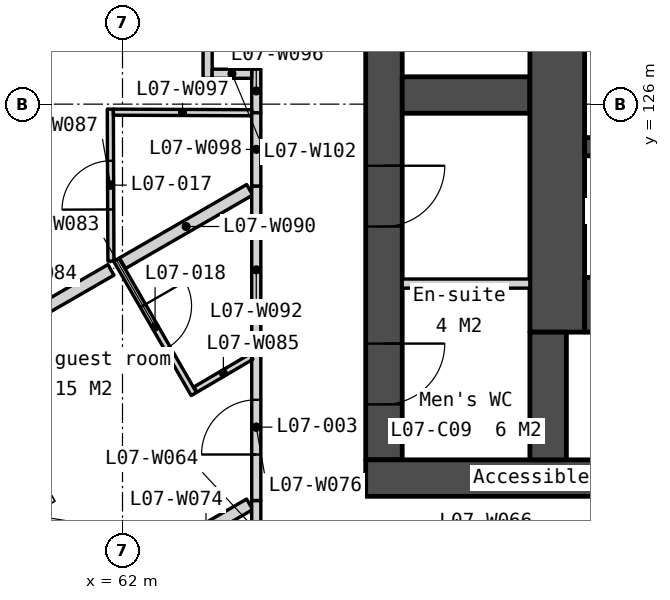
"""IFC4 building model, lengths in metres.
Left out: names, types, materials, properties, quantities, classifications, styles, units other than length and angle.
Written with IfcOpenShell. Run it as: python <this file> out.ifc"""

import sys

from ifc_helpers import new_model, si_unit, direction, frame, frame_2d, origin, place, context, subcontext, project, spatial, polyline, rectangle, outline, extrude, element, fill, save


model = new_model("IFC4")
c1 = context("Model", 3, precision=1e-05, world=origin(), true_north=direction((0.0, 1.0)))
c2 = subcontext(c1, "Body", "Model", "MODEL_VIEW")
j1 = project(units=[si_unit("LENGTHUNIT", "METRE"), si_unit("PLANEANGLEUNIT", "RADIAN")], contexts=[c1])
p1 = place(None, origin())
s1 = spatial("IfcSite", under=j1, at=p1, CompositionType="ELEMENT")
p2 = place(p1, origin())
s2 = spatial("IfcBuilding", under=s1, at=p2, CompositionType="ELEMENT")
p3 = place(p2, frame((0.0, 0.0, 38.5)))
s3 = spatial("IfcBuildingStorey", under=s2, at=p3, CompositionType="ELEMENT", Elevation=38.5)
p4 = place(p3, frame((66.3, 133.95, 0.0), z_axis=(0.0, 0.0, 1.0), x_axis=(0.0, -1.0, 0.0)))
e1 = element("IfcWall", 1, at=p4, inside=s3, PredefinedType="SOLIDWALL", context=c2, shape_type="SweptSolid", body=[
    extrude(rectangle(XDim=13.8, YDim=0.6, at=frame_2d((6.9, 0.0))), origin(), (0.0, 0.0, 1.0), 3.35),
])
p5 = place(p4, frame((0.6, 0.0, 0.0)))
e2 = element("IfcOpeningElement", 2, at=p5, cuts=e1, PredefinedType="OPENING", context=c2, shape_type="SweptSolid", body=[
    extrude(rectangle(XDim=1.1, YDim=2.1, at=frame_2d((0.55, 1.05))), frame((0.0, 0.31, 0.0), z_axis=(0.0, -1.0, 0.0), x_axis=(1.0, 0.0, 0.0)), (0.0, 0.0, 1.0), 0.62),
])
p6 = place(p4, frame((8.963, 0.0, 0.0)))
e3 = element("IfcOpeningElement", 3, at=p6, cuts=e1, PredefinedType="OPENING", context=c2, shape_type="SweptSolid", body=[
    extrude(rectangle(XDim=1.0, YDim=2.1, at=frame_2d((0.5, 1.05))), frame((0.0, 0.31, 0.0), z_axis=(0.0, -1.0, 0.0), x_axis=(1.0, 0.0, 0.0)), (0.0, 0.0, 1.0), 0.62),
])
p7 = place(p4, frame((11.888, 0.0, 0.0)))
e4 = element("IfcOpeningElement", 4, at=p7, cuts=e1, PredefinedType="OPENING", context=c2, shape_type="SweptSolid", body=[
    extrude(rectangle(XDim=1.0, YDim=2.1, at=frame_2d((0.5, 1.05))), frame((0.0, 0.31, 0.0), z_axis=(0.0, -1.0, 0.0), x_axis=(1.0, 0.0, 0.0)), (0.0, 0.0, 1.0), 0.62),
])
p8 = place(p3, frame((66.0, 119.85, 0.0), z_axis=(0.0, 0.0, 1.0), x_axis=(1.0, 0.0, 0.0)))
e5 = element("IfcWall", 5, at=p8, inside=s3, PredefinedType="SOLIDWALL", context=c2, shape_type="SweptSolid", body=[
    extrude(rectangle(XDim=28.0, YDim=0.6, at=frame_2d((14.0, 0.0))), origin(), (0.0, 0.0, 1.0), 3.35),
])
p9 = place(p8, frame((6.825, 0.0, 0.0)))
e6 = element("IfcOpeningElement", 6, at=p9, cuts=e5, PredefinedType="OPENING", context=c2, shape_type="SweptSolid", body=[
    extrude(rectangle(XDim=1.8, YDim=2.1, at=frame_2d((0.9, 1.05))), frame((0.0, 0.31, 0.0), z_axis=(0.0, -1.0, 0.0), x_axis=(1.0, 0.0, 0.0)), (0.0, 0.0, 1.0), 0.62),
])
p10 = place(p8, frame((15.85, 0.0, 0.0)))
e7 = element("IfcOpeningElement", 7, at=p10, cuts=e5, PredefinedType="OPENING", context=c2, shape_type="SweptSolid", body=[
    extrude(rectangle(XDim=1.5, YDim=2.1, at=frame_2d((0.75, 1.05))), frame((0.0, 0.31, 0.0), z_axis=(0.0, -1.0, 0.0), x_axis=(1.0, 0.0, 0.0)), (0.0, 0.0, 1.0), 0.62),
])
p11 = place(p8, frame((19.375, 0.0, 0.0)))
e8 = element("IfcOpeningElement", 8, at=p11, cuts=e5, PredefinedType="OPENING", context=c2, shape_type="SweptSolid", body=[
    extrude(rectangle(XDim=1.8, YDim=2.1, at=frame_2d((0.9, 1.05))), frame((0.0, 0.31, 0.0), z_axis=(0.0, -1.0, 0.0), x_axis=(1.0, 0.0, 0.0)), (0.0, 0.0, 1.0), 0.62),
])
p12 = place(p8, frame((4.425, 0.0, 0.0)))
e9 = element("IfcOpeningElement", 9, at=p12, cuts=e5, PredefinedType="OPENING", context=c2, shape_type="SweptSolid", body=[
    extrude(rectangle(XDim=1.0, YDim=2.1, at=frame_2d((0.5, 1.05))), frame((0.0, 0.31, 0.0), z_axis=(0.0, -1.0, 0.0), x_axis=(1.0, 0.0, 0.0)), (0.0, 0.0, 1.0), 0.62),
])
p13 = place(p8, frame((9.783, 0.0, 0.0)))
e10 = element("IfcOpeningElement", 10, at=p13, cuts=e5, PredefinedType="OPENING", context=c2, shape_type="SweptSolid", body=[
    extrude(rectangle(XDim=1.0, YDim=2.1, at=frame_2d((0.5, 1.05))), frame((0.0, 0.31, 0.0), z_axis=(0.0, -1.0, 0.0), x_axis=(1.0, 0.0, 0.0)), (0.0, 0.0, 1.0), 0.62),
])
p14 = place(p8, frame((11.525, 0.0, 0.0)))
e11 = element("IfcOpeningElement", 11, at=p14, cuts=e5, PredefinedType="OPENING", context=c2, shape_type="SweptSolid", body=[
    extrude(rectangle(XDim=1.0, YDim=2.1, at=frame_2d((0.5, 1.05))), frame((0.0, 0.31, 0.0), z_axis=(0.0, -1.0, 0.0), x_axis=(1.0, 0.0, 0.0)), (0.0, 0.0, 1.0), 0.62),
])
p15 = place(p8, frame((13.658, 0.0, 0.0)))
e12 = element("IfcOpeningElement", 12, at=p15, cuts=e5, PredefinedType="OPENING", context=c2, shape_type="SweptSolid", body=[
    extrude(rectangle(XDim=1.0, YDim=2.1, at=frame_2d((0.5, 1.05))), frame((0.0, 0.31, 0.0), z_axis=(0.0, -1.0, 0.0), x_axis=(1.0, 0.0, 0.0)), (0.0, 0.0, 1.0), 0.62),
])
p16 = place(p8, frame((22.575, 0.0, 0.0)))
e13 = element("IfcOpeningElement", 13, at=p16, cuts=e5, PredefinedType="OPENING", context=c2, shape_type="SweptSolid", body=[
    extrude(rectangle(XDim=1.0, YDim=2.1, at=frame_2d((0.5, 1.05))), frame((0.0, 0.31, 0.0), z_axis=(0.0, -1.0, 0.0), x_axis=(1.0, 0.0, 0.0)), (0.0, 0.0, 1.0), 0.62),
])
p17 = place(p3, frame((66.6, 126.15, 0.0), z_axis=(0.0, 0.0, 1.0), x_axis=(1.0, 0.0, 0.0)))
e14 = element("IfcWall", 14, at=p17, inside=s3, PredefinedType="SOLIDWALL", context=c2, shape_type="SweptSolid", body=[
    extrude(rectangle(XDim=2.1, YDim=0.6, at=frame_2d((1.05, 0.0))), origin(), (0.0, 0.0, 1.0), 3.35),
])
p18 = place(p3, frame((66.6, 123.049, 0.0), z_axis=(0.0, 0.0, 1.0), x_axis=(1.0, 0.0, 0.0)))
e15 = element("IfcWall", 15, at=p18, inside=s3, PredefinedType="PARTITIONING", context=c2, shape_type="SweptSolid", body=[
    extrude(rectangle(XDim=2.1, YDim=0.15, at=frame_2d((1.05, 0.0))), origin(), (0.0, 0.0, 1.0), 3.35),
])
p19 = place(p3, frame((69.15, 133.95, 0.0), z_axis=(0.0, 0.0, 1.0), x_axis=(0.0, -1.0, 0.0)))
e16 = element("IfcWall", 16, at=p19, inside=s3, PredefinedType="SOLIDWALL", context=c2, shape_type="SweptSolid", body=[
    extrude(rectangle(XDim=11.7, YDim=0.9, at=frame_2d((5.85, 0.0))), origin(), (0.0, 0.0, 1.0), 3.35),
])
p20 = place(p3, frame((69.0, 122.25, 0.0), z_axis=(0.0, 0.0, 1.0), x_axis=(0.0, -1.0, 0.0)))
e17 = element("IfcWall", 17, at=p20, inside=s3, PredefinedType="SOLIDWALL", context=c2, shape_type="SweptSolid", body=[
    extrude(rectangle(XDim=2.1, YDim=0.6, at=frame_2d((1.05, 0.0))), origin(), (0.0, 0.0, 1.0), 3.35),
])
p21 = place(p3, frame((69.6, 125.3, 0.0), z_axis=(0.0, 0.0, 1.0), x_axis=(1.0, 0.0, 0.0)))
e18 = element("IfcWall", 18, at=p21, inside=s3, PredefinedType="SOLIDWALL", context=c2, shape_type="SweptSolid", body=[
    extrude(rectangle(XDim=2.55, YDim=0.3, at=frame_2d((1.275, 0.0))), origin(), (0.0, 0.0, 1.0), 3.35),
])
p22 = place(p3, frame((69.6, 122.7, 0.0), z_axis=(0.0, 0.0, 1.0), x_axis=(1.0, 0.0, 0.0)))
e19 = element("IfcWall", 19, at=p22, inside=s3, PredefinedType="SOLIDWALL", context=c2, shape_type="SweptSolid", body=[
    extrude(rectangle(XDim=2.55, YDim=0.9, at=frame_2d((1.275, 0.0))), origin(), (0.0, 0.0, 1.0), 3.35),
])
p23 = place(p3, frame((54.495, 129.397, -0.15), z_axis=(0.0, 0.0, 1.0), x_axis=(0.499999201451, -0.866025864826, 0.0)))
e20 = element("IfcWall", 20, at=p23, inside=s3, PredefinedType="SOLIDWALL", context=c2, shape_type="SweptSolid", body=[
    extrude(outline(polyline([(44.8, 0.0), (44.8, 3.5), (0.0, 3.5), (0.0, 0.0), (44.8, 0.0)])), frame((0.0, 0.225, 0.0), z_axis=(0.0, -1.0, 0.0), x_axis=(1.0, 0.0, 0.0)), (0.0, 0.0, 1.0), 0.45),
])
p24 = place(p23, frame((0.722, 0.0, 1.05)))
e21 = element("IfcOpeningElement", 21, at=p24, cuts=e20, PredefinedType="OPENING", context=c2, shape_type="SweptSolid", body=[
    extrude(rectangle(XDim=1.2, YDim=1.5, at=frame_2d((0.6, 0.75))), frame((0.0, 0.235, 0.0), z_axis=(0.0, -1.0, 0.0), x_axis=(1.0, 0.0, 0.0)), (0.0, 0.0, 1.0), 0.47),
])
p25 = place(p23, frame((7.51, 0.0, 1.05)))
e22 = element("IfcOpeningElement", 22, at=p25, cuts=e20, PredefinedType="OPENING", context=c2, shape_type="SweptSolid", body=[
    extrude(rectangle(XDim=1.2, YDim=1.5, at=frame_2d((0.6, 0.75))), frame((0.0, 0.235, 0.0), z_axis=(0.0, -1.0, 0.0), x_axis=(1.0, 0.0, 0.0)), (0.0, 0.0, 1.0), 0.47),
])
p26 = place(p23, frame((9.21, 0.0, 1.05)))
e23 = element("IfcOpeningElement", 23, at=p26, cuts=e20, PredefinedType="OPENING", context=c2, shape_type="SweptSolid", body=[
    extrude(rectangle(XDim=1.2, YDim=1.5, at=frame_2d((0.6, 0.75))), frame((0.0, 0.235, 0.0), z_axis=(0.0, -1.0, 0.0), x_axis=(1.0, 0.0, 0.0)), (0.0, 0.0, 1.0), 0.47),
])
p27 = place(p23, frame((16.47, 0.0, 1.05)))
e24 = element("IfcOpeningElement", 24, at=p27, cuts=e20, PredefinedType="OPENING", context=c2, shape_type="SweptSolid", body=[
    extrude(rectangle(XDim=1.2, YDim=1.5, at=frame_2d((0.6, 0.75))), frame((0.0, 0.235, 0.0), z_axis=(0.0, -1.0, 0.0), x_axis=(1.0, 0.0, 0.0)), (0.0, 0.0, 1.0), 0.47),
])
p28 = place(p23, frame((18.17, 0.0, 1.05)))
e25 = element("IfcOpeningElement", 25, at=p28, cuts=e20, PredefinedType="OPENING", context=c2, shape_type="SweptSolid", body=[
    extrude(rectangle(XDim=1.2, YDim=1.5, at=frame_2d((0.6, 0.75))), frame((0.0, 0.235, 0.0), z_axis=(0.0, -1.0, 0.0), x_axis=(1.0, 0.0, 0.0)), (0.0, 0.0, 1.0), 0.47),
])
p29 = place(p23, frame((25.43, 0.0, 1.05)))
e26 = element("IfcOpeningElement", 26, at=p29, cuts=e20, PredefinedType="OPENING", context=c2, shape_type="SweptSolid", body=[
    extrude(rectangle(XDim=1.2, YDim=1.5, at=frame_2d((0.6, 0.75))), frame((0.0, 0.235, 0.0), z_axis=(0.0, -1.0, 0.0), x_axis=(1.0, 0.0, 0.0)), (0.0, 0.0, 1.0), 0.47),
])
p30 = place(p23, frame((27.13, 0.0, 1.05)))
e27 = element("IfcOpeningElement", 27, at=p30, cuts=e20, PredefinedType="OPENING", context=c2, shape_type="SweptSolid", body=[
    extrude(rectangle(XDim=1.2, YDim=1.5, at=frame_2d((0.6, 0.75))), frame((0.0, 0.235, 0.0), z_axis=(0.0, -1.0, 0.0), x_axis=(1.0, 0.0, 0.0)), (0.0, 0.0, 1.0), 0.47),
])
p31 = place(p23, frame((34.39, 0.0, 1.05)))
e28 = element("IfcOpeningElement", 28, at=p31, cuts=e20, PredefinedType="OPENING", context=c2, shape_type="SweptSolid", body=[
    extrude(rectangle(XDim=1.2, YDim=1.5, at=frame_2d((0.6, 0.75))), frame((0.0, 0.235, 0.0), z_axis=(0.0, -1.0, 0.0), x_axis=(1.0, 0.0, 0.0)), (0.0, 0.0, 1.0), 0.47),
])
p32 = place(p23, frame((36.09, 0.0, 1.05)))
e29 = element("IfcOpeningElement", 29, at=p32, cuts=e20, PredefinedType="OPENING", context=c2, shape_type="SweptSolid", body=[
    extrude(rectangle(XDim=1.2, YDim=1.5, at=frame_2d((0.6, 0.75))), frame((0.0, 0.235, 0.0), z_axis=(0.0, -1.0, 0.0), x_axis=(1.0, 0.0, 0.0)), (0.0, 0.0, 1.0), 0.47),
])
p33 = place(p23, frame((42.878, 0.0, 1.05)))
e30 = element("IfcOpeningElement", 30, at=p33, cuts=e20, PredefinedType="OPENING", context=c2, shape_type="SweptSolid", body=[
    extrude(rectangle(XDim=1.2, YDim=1.5, at=frame_2d((0.6, 0.75))), frame((0.0, 0.235, 0.0), z_axis=(0.0, -1.0, 0.0), x_axis=(1.0, 0.0, 0.0)), (0.0, 0.0, 1.0), 0.47),
])
p34 = place(p3, frame((62.654, 118.588, 0.0), z_axis=(0.0, 0.0, 1.0), x_axis=(0.866090081402, 0.499887958344, 0.0)))
e31 = element("IfcWall", 31, at=p34, inside=s3, PredefinedType="PARTITIONING", context=c2, shape_type="SweptSolid", body=[
    extrude(rectangle(XDim=1.66, YDim=0.2, at=frame_2d((0.83, 0.0))), origin(), (0.0, 0.0, 1.0), 3.35),
])
p35 = place(p3, frame((64.2, 117.825, 0.0), z_axis=(0.0, 0.0, 1.0), x_axis=(0.0, 1.0, 0.0)))
e32 = element("IfcWall", 32, at=p35, inside=s3, PredefinedType="PARTITIONING", context=c2, shape_type="SweptSolid", body=[
    extrude(rectangle(XDim=1.656, YDim=0.15, at=frame_2d((0.828, 0.0))), origin(), (0.0, 0.0, 1.0), 3.35),
])
p36 = place(p3, frame((64.2, 119.481, 0.0), z_axis=(0.0, 0.0, 1.0), x_axis=(0.0, 1.0, 0.0)))
e33 = element("IfcWall", 33, at=p36, inside=s3, PredefinedType="PARTITIONING", context=c2, shape_type="SweptSolid", body=[
    extrude(rectangle(XDim=2.413, YDim=0.15, at=frame_2d((1.207, 0.0))), origin(), (0.0, 0.0, 1.0), 3.35),
])
p37 = place(p36, frame((0.757, 0.0, 0.0)))
e34 = element("IfcOpeningElement", 34, at=p37, cuts=e33, PredefinedType="OPENING", context=c2, shape_type="SweptSolid", body=[
    extrude(rectangle(XDim=0.9, YDim=2.1, at=frame_2d((0.45, 1.05))), frame((0.0, 0.085, 0.0), z_axis=(0.0, -1.0, 0.0), x_axis=(1.0, 0.0, 0.0)), (0.0, 0.0, 1.0), 0.17),
])
p38 = place(p3, frame((61.898, 123.44, 0.0), z_axis=(0.0, 0.0, 1.0), x_axis=(0.499990435942, -0.866030925526, 0.0)))
e35 = element("IfcWall", 35, at=p38, inside=s3, PredefinedType="PARTITIONING", context=c2, shape_type="SweptSolid", body=[
    extrude(rectangle(XDim=2.55, YDim=0.1, at=frame_2d((1.275, 0.0))), origin(), (0.0, 0.0, 1.0), 3.35),
])
p39 = place(p38, frame((0.875, 0.0, 0.0)))
e36 = element("IfcOpeningElement", 36, at=p39, cuts=e35, PredefinedType="OPENING", context=c2, shape_type="SweptSolid", body=[
    extrude(rectangle(XDim=0.8, YDim=2.1, at=frame_2d((0.4, 1.05))), frame((0.0, 0.06, 0.0), z_axis=(0.0, -1.0, 0.0), x_axis=(1.0, 0.0, 0.0)), (0.0, 0.0, 1.0), 0.12),
])
p40 = place(p3, frame((59.17, 121.75, 0.0), z_axis=(0.0, 0.0, 1.0), x_axis=(0.86606157367, 0.499937346687, 0.0)))
e37 = element("IfcWall", 37, at=p40, inside=s3, PredefinedType="PARTITIONING", context=c2, shape_type="SweptSolid", body=[
    extrude(rectangle(XDim=3.049, YDim=0.2, at=frame_2d((1.524, 0.0))), origin(), (0.0, 0.0, 1.0), 3.35),
])
p41 = place(p3, frame((63.2, 121.306, 0.0), z_axis=(0.0, 0.0, 1.0), x_axis=(0.86196956313, 0.506960030216, 0.0)))
e38 = element("IfcWall", 38, at=p41, inside=s3, PredefinedType="PARTITIONING", context=c2, shape_type="SweptSolid", body=[
    extrude(rectangle(XDim=1.065, YDim=0.1, at=frame_2d((0.533, 0.0))), origin(), (0.0, 0.0, 1.0), 3.35),
])
p42 = place(p3, frame((61.809, 123.418, 0.0), z_axis=(0.0, 0.0, 1.0), x_axis=(-0.003807822423, 0.999992750218, 0.0)))
e39 = element("IfcWall", 39, at=p42, inside=s3, PredefinedType="PARTITIONING", context=c2, shape_type="SweptSolid", body=[
    extrude(rectangle(XDim=2.5, YDim=0.1, at=frame_2d((1.25, 0.0))), origin(), (0.0, 0.0, 1.0), 3.35),
])
p43 = place(p42, frame((0.85, 0.0, 0.0)))
e40 = element("IfcOpeningElement", 40, at=p43, cuts=e39, PredefinedType="OPENING", context=c2, shape_type="SweptSolid", body=[
    extrude(rectangle(XDim=0.8, YDim=2.1, at=frame_2d((0.4, 1.05))), frame((0.0, 0.06, 0.0), z_axis=(0.0, -1.0, 0.0), x_axis=(1.0, 0.0, 0.0)), (0.0, 0.0, 1.0), 0.12),
])
p44 = place(p3, frame((62.0, 123.384, 0.0), z_axis=(0.0, 0.0, 1.0), x_axis=(0.866032396701, 0.499987887718, 0.0)))
e41 = element("IfcWall", 41, at=p44, inside=s3, PredefinedType="PARTITIONING", context=c2, shape_type="SweptSolid", body=[
    extrude(rectangle(XDim=2.415, YDim=0.2, at=frame_2d((1.208, 0.0))), origin(), (0.0, 0.0, 1.0), 3.35),
])
p45 = place(p3, frame((64.2, 121.894, 0.0), z_axis=(0.0, 0.0, 1.0), x_axis=(0.0, 1.0, 0.0)))
e42 = element("IfcWall", 42, at=p45, inside=s3, PredefinedType="PARTITIONING", context=c2, shape_type="SweptSolid", body=[
    extrude(rectangle(XDim=2.76, YDim=0.15, at=frame_2d((1.38, 0.0))), origin(), (0.0, 0.0, 1.0), 3.35),
])
p46 = place(p3, frame((64.2, 125.858, 0.0), z_axis=(0.0, 0.0, 1.0), x_axis=(0.0, 1.0, 0.0)))
e43 = element("IfcWall", 43, at=p46, inside=s3, PredefinedType="PARTITIONING", context=c2, shape_type="SweptSolid", body=[
    extrude(rectangle(XDim=0.717, YDim=0.15, at=frame_2d((0.358, 0.0))), origin(), (0.0, 0.0, 1.0), 3.35),
])
p47 = place(p3, frame((61.85, 125.868, 0.0), z_axis=(0.0, 0.0, 1.0), x_axis=(0.999991684538, -0.004078094442, 0.0)))
e44 = element("IfcWall", 44, at=p47, inside=s3, PredefinedType="PARTITIONING", context=c2, shape_type="SweptSolid", body=[
    extrude(rectangle(XDim=2.275, YDim=0.1, at=frame_2d((1.137, 0.0))), origin(), (0.0, 0.0, 1.0), 3.35),
])
p48 = place(p3, frame((64.2, 124.654, 0.0), z_axis=(0.0, 0.0, 1.0), x_axis=(0.0, 1.0, 0.0)))
e45 = element("IfcWall", 45, at=p48, inside=s3, PredefinedType="PARTITIONING", context=c2, shape_type="SweptSolid", body=[
    extrude(rectangle(XDim=1.204, YDim=0.15, at=frame_2d((0.602, 0.0))), origin(), (0.0, 0.0, 1.0), 3.35),
])
p49 = place(p3, frame((63.4, 126.425, 0.0), z_axis=(0.0, 0.0, 1.0), x_axis=(0.0, 1.0, 0.0)))
e46 = element("IfcWall", 46, at=p49, inside=s3, PredefinedType="PARTITIONING", context=c2, shape_type="SweptSolid", body=[
    extrude(rectangle(XDim=7.649, YDim=0.15, at=frame_2d((3.825, 0.0))), origin(), (0.0, 0.0, 1.0), 3.35),
])
p50 = place(p49, frame((3.375, 0.0, 0.0)))
e47 = element("IfcOpeningElement", 47, at=p50, cuts=e46, PredefinedType="OPENING", context=c2, shape_type="SweptSolid", body=[
    extrude(rectangle(XDim=0.9, YDim=2.1, at=frame_2d((0.45, 1.05))), frame((0.0, 0.085, 0.0), z_axis=(0.0, -1.0, 0.0), x_axis=(1.0, 0.0, 0.0)), (0.0, 0.0, 1.0), 0.17),
])
p51 = place(p3, frame((63.475, 126.5, 0.0), z_axis=(0.0, 0.0, 1.0), x_axis=(1.0, 0.0, 0.0)))
e48 = element("IfcWall", 48, at=p51, inside=s3, PredefinedType="PARTITIONING", context=c2, shape_type="SweptSolid", body=[
    extrude(rectangle(XDim=0.65, YDim=0.15, at=frame_2d((0.325, 0.0))), origin(), (0.0, 0.0, 1.0), 3.35),
])
p52 = place(p6, origin())
e49 = element("IfcDoor", 49, at=p52, inside=s3, OperationType="SINGLE_SWING_LEFT", PredefinedType="DOOR", context=c2, shape_type="SweptSolid", body=[
    extrude(rectangle(XDim=1.0, YDim=2.1, at=frame_2d((0.5, 1.05))), frame((0.0, 0.025, 0.0), z_axis=(0.0, -1.0, 0.0), x_axis=(1.0, 0.0, 0.0)), (0.0, 0.0, 1.0), 0.05),
])
fill(e3, e49)
p53 = place(p7, origin())
e50 = element("IfcDoor", 50, at=p53, inside=s3, OperationType="SINGLE_SWING_LEFT", PredefinedType="DOOR", context=c2, shape_type="SweptSolid", body=[
    extrude(rectangle(XDim=1.0, YDim=2.1, at=frame_2d((0.5, 1.05))), frame((0.0, 0.025, 0.0), z_axis=(0.0, -1.0, 0.0), x_axis=(1.0, 0.0, 0.0)), (0.0, 0.0, 1.0), 0.05),
])
fill(e4, e50)
p54 = place(p37, origin())
e51 = element("IfcDoor", 51, at=p54, inside=s3, OperationType="SINGLE_SWING_LEFT", PredefinedType="DOOR", context=c2, shape_type="SweptSolid", body=[
    extrude(rectangle(XDim=0.9, YDim=2.1, at=frame_2d((0.45, 1.05))), frame((0.0, 0.025, 0.0), z_axis=(0.0, -1.0, 0.0), x_axis=(1.0, 0.0, 0.0)), (0.0, 0.0, 1.0), 0.05),
])
fill(e34, e51)
p55 = place(p43, origin())
e52 = element("IfcDoor", 52, at=p55, inside=s3, OperationType="SINGLE_SWING_LEFT", PredefinedType="DOOR", context=c2, shape_type="SweptSolid", body=[
    extrude(rectangle(XDim=0.8, YDim=2.1, at=frame_2d((0.4, 1.05))), frame((0.0, 0.025, 0.0), z_axis=(0.0, -1.0, 0.0), x_axis=(1.0, 0.0, 0.0)), (0.0, 0.0, 1.0), 0.05),
])
fill(e40, e52)
p56 = place(p39, origin())
e53 = element("IfcDoor", 53, at=p56, inside=s3, OperationType="SINGLE_SWING_LEFT", PredefinedType="DOOR", context=c2, shape_type="SweptSolid", body=[
    extrude(rectangle(XDim=0.8, YDim=2.1, at=frame_2d((0.4, 1.05))), frame((0.0, 0.025, 0.0), z_axis=(0.0, -1.0, 0.0), x_axis=(1.0, 0.0, 0.0)), (0.0, 0.0, 1.0), 0.05),
])
fill(e36, e53)
save(model, sys.argv[1])
